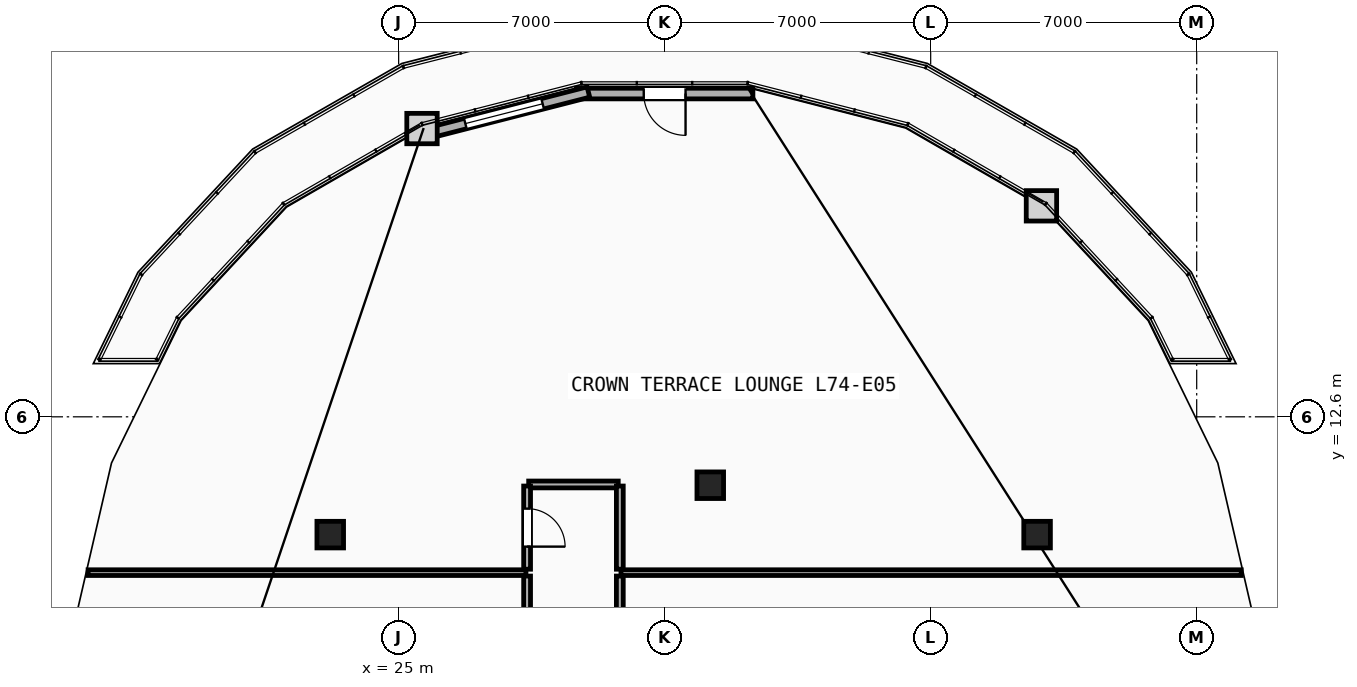
"""IFC4 building model, lengths in metres.
Left out: names, types, materials, properties, quantities, classifications, styles, units other than length and angle.
Written with IfcOpenShell. Run it as: python <this file> out.ifc"""

import sys

from ifc_helpers import new_model, si_unit, direction, frame, frame_2d, origin, origin_2d, place, context, subcontext, project, spatial, rectangle, extrude, element, fill, save


model = new_model("IFC4")
c1 = context("Model", 3, precision=1e-05, world=origin(), true_north=direction((0.0, 1.0)))
c2 = subcontext(c1, "Body", "Model", "MODEL_VIEW")
j1 = project(units=[si_unit("LENGTHUNIT", "METRE"), si_unit("PLANEANGLEUNIT", "RADIAN")], contexts=[c1])
p1 = place(None, origin())
s1 = spatial("IfcSite", under=j1, at=p1, CompositionType="ELEMENT")
p2 = place(p1, origin())
s2 = spatial("IfcBuilding", under=s1, at=p2, CompositionType="ELEMENT")
p3 = place(p2, frame((0.0, 0.0, 279.2)))
s3 = spatial("IfcBuildingStorey", under=s2, at=p3, CompositionType="ELEMENT", Elevation=279.2)
for number, where, z_axis, x_axis in (
    (1, (41.8, 9.5, 0.0), (0.0, 0.0, 1.0), (1.0, 0.0, 0.0)),
    (2, (33.2, 10.8, 0.0), (0.0, 0.0, 1.0), (1.0, 0.0, 0.0)),
    (3, (23.2, 9.5, 0.0), (0.0, 0.0, 1.0), (1.0, 0.0, 0.0)),
):
    element("IfcColumn", number, at=place(p3, frame(where, z_axis=z_axis, x_axis=x_axis)), inside=s3, PredefinedType="COLUMN", context=c2, shape_type="SweptSolid", body=[
        extrude(rectangle(XDim=0.7, YDim=0.7, at=origin_2d()), origin(), (0.0, 0.0, 1.0), 3.6),
    ])
p4 = place(p3, frame((34.322, 21.106, 0.0), z_axis=(0.0, 0.0, 1.0), x_axis=(-1.0, 0.0, 0.0)))
e4 = element("IfcWall", 4, at=p4, inside=s3, PredefinedType="SOLIDWALL", context=c2, shape_type="SweptSolid", body=[
    extrude(rectangle(XDim=4.644, YDim=0.28, at=frame_2d((2.322, 0.0))), origin(), (0.0, 0.0, 1.0), 3.34),
])
p5 = place(p4, frame((1.772, 0.0, 0.0)))
e5 = element("IfcOpeningElement", 5, at=p5, cuts=e4, PredefinedType="OPENING", context=c2, shape_type="SweptSolid", body=[
    extrude(rectangle(XDim=1.1, YDim=2.2, at=frame_2d((0.55, 1.1))), frame((0.0, 0.15, 0.0), z_axis=(0.0, -1.0, 0.0), x_axis=(1.0, 0.0, 0.0)), (0.0, 0.0, 1.0), 0.3),
])
p6 = place(p3, frame((29.993, 21.146, 0.0), z_axis=(0.0, 0.0, 1.0), x_axis=(-0.968658938671, -0.248394566232, 0.0)))
e6 = element("IfcWall", 6, at=p6, inside=s3, PredefinedType="SOLIDWALL", context=c2, shape_type="SweptSolid", body=[
    extrude(rectangle(XDim=4.585, YDim=0.28, at=frame_2d((2.292, 0.0))), origin(), (0.0, 0.0, 1.0), 3.34),
])
p7 = place(p6, frame((1.243, 0.0, 0.3)))
e7 = element("IfcOpeningElement", 7, at=p7, cuts=e6, PredefinedType="OPENING", context=c2, shape_type="SweptSolid", body=[
    extrude(rectangle(XDim=2.1, YDim=2.6, at=frame_2d((1.05, 1.3))), frame((0.0, 0.15, 0.0), z_axis=(0.0, -1.0, 0.0), x_axis=(1.0, 0.0, 0.0)), (0.0, 0.0, 1.0), 0.3),
])
p8 = place(p3, frame((16.828, 8.5, 0.0), z_axis=(0.0, 0.0, 1.0), x_axis=(1.0, 0.0, 0.0)))
e8 = element("IfcWall", 8, at=p8, inside=s3, PredefinedType="PARTITIONING", context=c2, shape_type="SweptSolid", body=[
    extrude(rectangle(XDim=11.522, YDim=0.15, at=frame_2d((5.761, 0.0))), origin(), (0.0, 0.0, 1.0), 3.34),
])
p9 = place(p3, frame((30.85, 8.5, 0.0), z_axis=(0.0, 0.0, 1.0), x_axis=(1.0, 0.0, 0.0)))
e9 = element("IfcWall", 9, at=p9, inside=s3, PredefinedType="PARTITIONING", context=c2, shape_type="SweptSolid", body=[
    extrude(rectangle(XDim=16.322, YDim=0.15, at=frame_2d((8.161, 0.0))), origin(), (0.0, 0.0, 1.0), 3.34),
])
p10 = place(p3, frame((28.38, 8.41, 0.0), z_axis=(0.0, 0.0, 1.0), x_axis=(0.0, -1.0, 0.0)))
e10 = element("IfcWall", 10, at=p10, inside=s3, PredefinedType="PARTITIONING", context=c2, shape_type="SweptSolid", body=[
    extrude(rectangle(XDim=7.96, YDim=0.18, at=frame_2d((3.98, 0.0))), origin(), (0.0, 0.0, 1.0), 3.34),
])
p11 = place(p10, frame((3.48, 0.0, 0.0)))
e11 = element("IfcOpeningElement", 11, at=p11, cuts=e10, PredefinedType="OPENING", context=c2, shape_type="SweptSolid", body=[
    extrude(rectangle(XDim=1.0, YDim=2.15, at=frame_2d((0.5, 1.075))), frame((0.0, 0.1, 0.0), z_axis=(0.0, -1.0, 0.0), x_axis=(1.0, 0.0, 0.0)), (0.0, 0.0, 1.0), 0.2),
])
p12 = place(p3, frame((30.82, 0.45, 0.0), z_axis=(0.0, 0.0, 1.0), x_axis=(0.0, 1.0, 0.0)))
e12 = element("IfcWall", 12, at=p12, inside=s3, PredefinedType="PARTITIONING", context=c2, shape_type="SweptSolid", body=[
    extrude(rectangle(XDim=7.96, YDim=0.18, at=frame_2d((3.98, 0.0))), origin(), (0.0, 0.0, 1.0), 3.34),
])
p13 = place(p12, frame((3.48, 0.0, 0.0)))
e13 = element("IfcOpeningElement", 13, at=p13, cuts=e12, PredefinedType="OPENING", context=c2, shape_type="SweptSolid", body=[
    extrude(rectangle(XDim=1.0, YDim=2.15, at=frame_2d((0.5, 1.075))), frame((0.0, 0.1, 0.0), z_axis=(0.0, -1.0, 0.0), x_axis=(1.0, 0.0, 0.0)), (0.0, 0.0, 1.0), 0.2),
])
p14 = place(p3, frame((30.779, 10.82, 0.0), z_axis=(0.0, 0.0, 1.0), x_axis=(-1.0, 0.0, 0.0)))
e14 = element("IfcWall", 14, at=p14, inside=s3, PredefinedType="PARTITIONING", context=c2, shape_type="SweptSolid", body=[
    extrude(rectangle(XDim=2.357, YDim=0.18, at=frame_2d((1.179, 0.0))), origin(), (0.0, 0.0, 1.0), 3.34),
])
p15 = place(p3, frame((28.38, 10.779, 0.0), z_axis=(0.0, 0.0, 1.0), x_axis=(0.0, -1.0, 0.0)))
e15 = element("IfcWall", 15, at=p15, inside=s3, PredefinedType="PARTITIONING", context=c2, shape_type="SweptSolid", body=[
    extrude(rectangle(XDim=2.188, YDim=0.18, at=frame_2d((1.094, 0.0))), origin(), (0.0, 0.0, 1.0), 3.34),
])
p16 = place(p15, frame((0.594, 0.0, 0.0)))
e16 = element("IfcOpeningElement", 16, at=p16, cuts=e15, PredefinedType="OPENING", context=c2, shape_type="SweptSolid", body=[
    extrude(rectangle(XDim=1.0, YDim=2.15, at=frame_2d((0.5, 1.075))), frame((0.0, 0.1, 0.0), z_axis=(0.0, -1.0, 0.0), x_axis=(1.0, 0.0, 0.0)), (0.0, 0.0, 1.0), 0.2),
])
p17 = place(p3, frame((30.82, 8.59, 0.0), z_axis=(0.0, 0.0, 1.0), x_axis=(0.0, 1.0, 0.0)))
e17 = element("IfcWall", 17, at=p17, inside=s3, PredefinedType="PARTITIONING", context=c2, shape_type="SweptSolid", body=[
    extrude(rectangle(XDim=2.188, YDim=0.18, at=frame_2d((1.094, 0.0))), origin(), (0.0, 0.0, 1.0), 3.34),
])
p18 = place(p5, origin())
e18 = element("IfcDoor", 18, at=p18, inside=s3, OperationType="SINGLE_SWING_LEFT", PredefinedType="DOOR", context=c2, shape_type="SweptSolid", body=[
    extrude(rectangle(XDim=1.1, YDim=2.2, at=frame_2d((0.55, 1.1))), frame((0.0, 0.025, 0.0), z_axis=(0.0, -1.0, 0.0), x_axis=(1.0, 0.0, 0.0)), (0.0, 0.0, 1.0), 0.05),
])
fill(e5, e18)
p19 = place(p7, origin())
e19 = element("IfcWindow", 19, at=p19, inside=s3, PartitioningType="SINGLE_PANEL", PredefinedType="WINDOW", context=c2, shape_type="SweptSolid", body=[
    extrude(rectangle(XDim=2.1, YDim=2.6, at=frame_2d((1.05, 1.3))), frame((0.0, 0.03, 0.0), z_axis=(0.0, -1.0, 0.0), x_axis=(1.0, 0.0, 0.0)), (0.0, 0.0, 1.0), 0.06),
])
fill(e7, e19)
p20 = place(p16, origin())
e20 = element("IfcDoor", 20, at=p20, inside=s3, OperationType="SINGLE_SWING_RIGHT", PredefinedType="DOOR", context=c2, shape_type="SweptSolid", body=[
    extrude(rectangle(XDim=1.0, YDim=2.15, at=frame_2d((0.5, 1.075))), frame((0.0, 0.025, 0.0), z_axis=(0.0, -1.0, 0.0), x_axis=(1.0, 0.0, 0.0)), (0.0, 0.0, 1.0), 0.05),
])
fill(e16, e20)
save(model, sys.argv[1])
